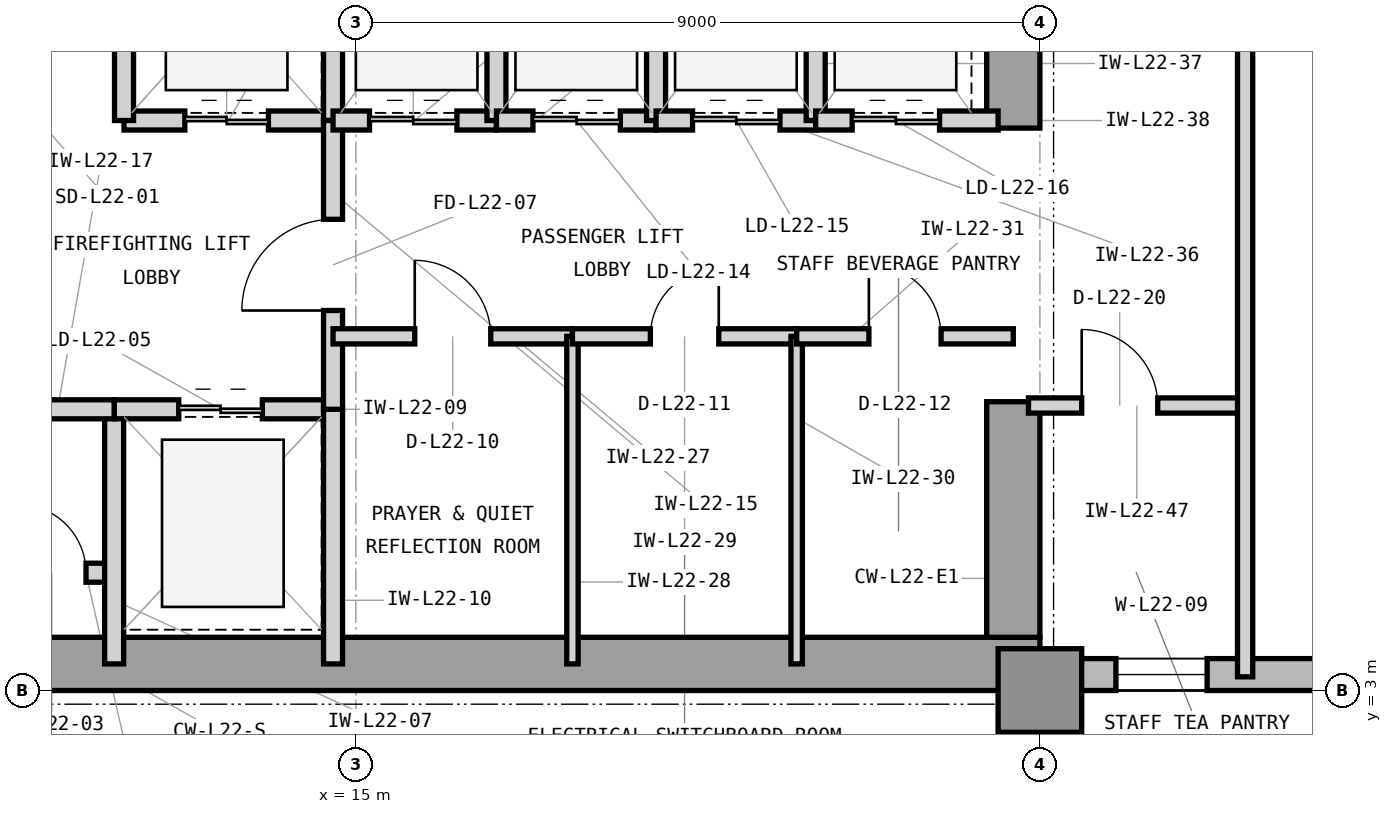
"""IFC4 building model, lengths in metres.
Left out: names, types, materials, properties, quantities, classifications, styles, units other than length and angle.
Written with IfcOpenShell. Run it as: python <this file> out.ifc"""

import sys

from ifc_helpers import new_model, si_unit, direction, frame, frame_2d, origin, origin_2d, place, context, subcontext, project, spatial, rectangle, extrude, element, fill, save


model = new_model("IFC4")
c1 = context("Model", 3, precision=1e-05, world=origin(), true_north=direction((0.0, 1.0)))
c2 = subcontext(c1, "Body", "Model", "MODEL_VIEW")
j1 = project(units=[si_unit("LENGTHUNIT", "METRE"), si_unit("PLANEANGLEUNIT", "RADIAN")], contexts=[c1])
p1 = place(None, origin())
s1 = spatial("IfcSite", under=j1, at=p1, CompositionType="ELEMENT")
p2 = place(p1, origin())
s2 = spatial("IfcBuilding", under=s1, at=p2, CompositionType="ELEMENT")
p3 = place(p2, frame((0.0, 0.0, 97.2)))
s3 = spatial("IfcBuildingStorey", under=s2, at=p3, CompositionType="ELEMENT", Elevation=97.2)
p4 = place(p3, frame((7.475, 3.35, 0.0), z_axis=(0.0, 0.0, 1.0), x_axis=(1.0, 0.0, 0.0)))
e1 = element("IfcWall", 1, at=p4, inside=s3, PredefinedType="SHEAR", context=c2, shape_type="SweptSolid", body=[
    extrude(rectangle(XDim=16.525, YDim=0.7, at=frame_2d((8.262, 0.0))), origin(), (0.0, 0.0, 1.0), 3.9),
])
p5 = place(p3, frame((23.65, 3.7, 0.0), z_axis=(0.0, 0.0, 1.0), x_axis=(0.0, 1.0, 0.0)))
e2 = element("IfcWall", 2, at=p5, inside=s3, PredefinedType="SHEAR", context=c2, shape_type="SweptSolid", body=[
    extrude(rectangle(XDim=3.1, YDim=0.7, at=frame_2d((1.55, 0.0))), origin(), (0.0, 0.0, 1.0), 3.9),
])
p6 = place(p3, frame((23.65, 10.4, 0.0), z_axis=(0.0, 0.0, 1.0), x_axis=(0.0, 1.0, 0.0)))
e3 = element("IfcWall", 3, at=p6, inside=s3, PredefinedType="SHEAR", context=c2, shape_type="SweptSolid", body=[
    extrude(rectangle(XDim=3.2, YDim=0.7, at=frame_2d((1.6, 0.0))), origin(), (0.0, 0.0, 1.0), 3.9),
])
p7 = place(p3, frame((24.0, 3.0, 0.0), z_axis=(0.0, 0.0, 1.0), x_axis=(1.0, 0.0, 0.0)))
e4 = element("IfcColumn", 4, at=p7, inside=s3, PredefinedType="COLUMN", context=c2, shape_type="SweptSolid", body=[
    extrude(rectangle(XDim=1.1, YDim=1.1, at=origin_2d()), origin(), (0.0, 0.0, 1.0), 3.9),
])
p8 = place(p3, frame((23.9, 3.21, 0.0), z_axis=(0.0, 0.0, 1.0), x_axis=(1.0, 0.0, 0.0)))
e5 = element("IfcWall", 5, at=p8, inside=s3, PredefinedType="STANDARD", context=c2, shape_type="SweptSolid", body=[
    extrude(rectangle(XDim=37.5, YDim=0.42, at=frame_2d((18.75, 0.0))), origin(), (0.0, 0.0, 1.0), 3.7),
])
p9 = place(p8, frame((19.844, 0.0, 0.85)))
e6 = element("IfcOpeningElement", 6, at=p9, cuts=e5, PredefinedType="OPENING", context=c2, shape_type="SweptSolid", body=[
    extrude(rectangle(XDim=2.5, YDim=2.25, at=frame_2d((1.25, 1.125))), frame((0.0, 0.22, 0.0), z_axis=(0.0, -1.0, 0.0), x_axis=(1.0, 0.0, 0.0)), (0.0, 0.0, 1.0), 0.44),
])
p10 = place(p8, frame((1.1, 0.0, 0.85)))
e7 = element("IfcOpeningElement", 7, at=p10, cuts=e5, PredefinedType="OPENING", context=c2, shape_type="SweptSolid", body=[
    extrude(rectangle(XDim=1.2, YDim=2.25, at=frame_2d((0.6, 1.125))), frame((0.0, 0.22, 0.0), z_axis=(0.0, -1.0, 0.0), x_axis=(1.0, 0.0, 0.0)), (0.0, 0.0, 1.0), 0.44),
])
p11 = place(p8, frame((5.286, 0.0, 0.85)))
e8 = element("IfcOpeningElement", 8, at=p11, cuts=e5, PredefinedType="OPENING", context=c2, shape_type="SweptSolid", body=[
    extrude(rectangle(XDim=2.5, YDim=2.25, at=frame_2d((1.25, 1.125))), frame((0.0, 0.22, 0.0), z_axis=(0.0, -1.0, 0.0), x_axis=(1.0, 0.0, 0.0)), (0.0, 0.0, 1.0), 0.44),
])
p12 = place(p8, frame((13.036, 0.0, 0.85)))
e9 = element("IfcOpeningElement", 9, at=p12, cuts=e5, PredefinedType="OPENING", context=c2, shape_type="SweptSolid", body=[
    extrude(rectangle(XDim=2.5, YDim=2.25, at=frame_2d((1.25, 1.125))), frame((0.0, 0.22, 0.0), z_axis=(0.0, -1.0, 0.0), x_axis=(1.0, 0.0, 0.0)), (0.0, 0.0, 1.0), 0.44),
])
p13 = place(p8, frame((27.986, 0.0, 0.85)))
e10 = element("IfcOpeningElement", 10, at=p13, cuts=e5, PredefinedType="OPENING", context=c2, shape_type="SweptSolid", body=[
    extrude(rectangle(XDim=1.2, YDim=2.25, at=frame_2d((0.6, 1.125))), frame((0.0, 0.22, 0.0), z_axis=(0.0, -1.0, 0.0), x_axis=(1.0, 0.0, 0.0)), (0.0, 0.0, 1.0), 0.44),
])
p14 = place(p3, frame((10.33, 4.55, 0.0), z_axis=(0.0, 0.0, 1.0), x_axis=(1.0, 0.0, 0.0)))
e11 = element("IfcWall", 11, at=p14, inside=s3, PredefinedType="PARTITIONING", context=c2, shape_type="SweptSolid", body=[
    extrude(rectangle(XDim=1.49, YDim=0.25, at=frame_2d((0.745, 0.0))), origin(), (0.0, 0.0, 1.0), 3.69),
])
p15 = place(p14, frame((0.22, 0.0, 0.0)))
e12 = element("IfcOpeningElement", 12, at=p15, cuts=e11, PredefinedType="OPENING", context=c2, shape_type="SweptSolid", body=[
    extrude(rectangle(XDim=0.9, YDim=2.1, at=frame_2d((0.45, 1.05))), frame((0.0, 0.135, 0.0), z_axis=(0.0, -1.0, 0.0), x_axis=(1.0, 0.0, 0.0)), (0.0, 0.0, 1.0), 0.27),
])
p16 = place(p3, frame((11.82, 3.35, 0.0), z_axis=(0.0, 0.0, 1.0), x_axis=(0.0, 1.0, 0.0)))
e13 = element("IfcWall", 13, at=p16, inside=s3, PredefinedType="PARTITIONING", context=c2, shape_type="SweptSolid", body=[
    extrude(rectangle(XDim=3.35, YDim=0.25, at=frame_2d((1.675, 0.0))), origin(), (0.0, 0.0, 1.0), 3.69),
])
p17 = place(p3, frame((11.82, 6.7, 0.0), z_axis=(0.0, 0.0, 1.0), x_axis=(1.0, 0.0, 0.0)))
e14 = element("IfcWall", 14, at=p17, inside=s3, PredefinedType="PARTITIONING", context=c2, shape_type="SweptSolid", body=[
    extrude(rectangle(XDim=2.88, YDim=0.25, at=frame_2d((1.44, 0.0))), origin(), (0.0, 0.0, 1.0), 3.227),
])
p18 = place(p17, frame((0.85, 0.0, 0.0)))
e15 = element("IfcOpeningElement", 15, at=p18, cuts=e14, PredefinedType="OPENING", context=c2, shape_type="SweptSolid", body=[
    extrude(rectangle(XDim=1.1, YDim=2.25, at=frame_2d((0.55, 1.125))), frame((0.0, 0.135, 0.0), z_axis=(0.0, -1.0, 0.0), x_axis=(1.0, 0.0, 0.0)), (0.0, 0.0, 1.0), 0.27),
])
p19 = place(p3, frame((14.7, 3.35, 0.0), z_axis=(0.0, 0.0, 1.0), x_axis=(0.0, 1.0, 0.0)))
e16 = element("IfcWall", 16, at=p19, inside=s3, PredefinedType="PARTITIONING", context=c2, shape_type="SweptSolid", body=[
    extrude(rectangle(XDim=3.35, YDim=0.25, at=frame_2d((1.675, 0.0))), origin(), (0.0, 0.0, 1.0), 3.69),
])
p20 = place(p3, frame((11.95, 10.5, 0.0), z_axis=(0.0, 0.0, 1.0), x_axis=(1.0, 0.0, 0.0)))
e17 = element("IfcWall", 17, at=p20, inside=s3, PredefinedType="PARTITIONING", context=c2, shape_type="SweptSolid", body=[
    extrude(rectangle(XDim=2.75, YDim=0.25, at=frame_2d((1.375, 0.0))), origin(), (0.0, 0.0, 1.0), 3.227),
])
p21 = place(p20, frame((0.8, 0.0, 0.0)))
e18 = element("IfcOpeningElement", 18, at=p21, cuts=e17, PredefinedType="OPENING", context=c2, shape_type="SweptSolid", body=[
    extrude(rectangle(XDim=1.1, YDim=2.25, at=frame_2d((0.55, 1.125))), frame((0.0, 0.135, 0.0), z_axis=(0.0, -1.0, 0.0), x_axis=(1.0, 0.0, 0.0)), (0.0, 0.0, 1.0), 0.27),
])
for number, where, z_axis, x_axis in (
    (19, (11.95, 10.5, 0.0), (0.0, 0.0, 1.0), (0.0, 1.0, 0.0)),
    (20, (14.7, 10.5, 0.0), (0.0, 0.0, 1.0), (0.0, 1.0, 0.0)),
):
    element("IfcWall", number, at=place(p3, frame(where, z_axis=z_axis, x_axis=x_axis)), inside=s3, PredefinedType="PARTITIONING", context=c2, shape_type="SweptSolid", body=[
        extrude(rectangle(XDim=3.0, YDim=0.25, at=frame_2d((1.5, 0.0))), origin(), (0.0, 0.0, 1.0), 3.69),
    ])
p22 = place(p3, frame((14.7, 6.7, 0.0), z_axis=(0.0, 0.0, 1.0), x_axis=(0.0, 1.0, 0.0)))
e21 = element("IfcWall", 21, at=p22, inside=s3, PredefinedType="PARTITIONING", context=c2, shape_type="SweptSolid", body=[
    extrude(rectangle(XDim=3.8, YDim=0.25, at=frame_2d((1.9, 0.0))), origin(), (0.0, 0.0, 1.0), 3.69),
])
p23 = place(p22, frame((1.3, 0.0, 0.0)))
e22 = element("IfcOpeningElement", 22, at=p23, cuts=e21, PredefinedType="OPENING", context=c2, shape_type="SweptSolid", body=[
    extrude(rectangle(XDim=1.2, YDim=2.2, at=frame_2d((0.6, 1.1))), frame((0.0, 0.135, 0.0), z_axis=(0.0, -1.0, 0.0), x_axis=(1.0, 0.0, 0.0)), (0.0, 0.0, 1.0), 0.27),
])
p24 = place(p3, frame((10.33, 6.7, 0.0), z_axis=(0.0, 0.0, 1.0), x_axis=(1.0, 0.0, 0.0)))
e23 = element("IfcWall", 23, at=p24, inside=s3, PredefinedType="PARTITIONING", context=c2, shape_type="SweptSolid", body=[
    extrude(rectangle(XDim=1.49, YDim=0.25, at=frame_2d((0.745, 0.0))), origin(), (0.0, 0.0, 1.0), 3.227),
])
p25 = place(p3, frame((14.7, 7.66, 0.0), z_axis=(0.0, 0.0, 1.0), x_axis=(1.0, 0.0, 0.0)))
e24 = element("IfcWall", 24, at=p25, inside=s3, PredefinedType="PARTITIONING", context=c2, shape_type="SweptSolid", body=[
    extrude(rectangle(XDim=3.15, YDim=0.2, at=frame_2d((1.575, 0.0))), origin(), (0.0, 0.0, 1.0), 3.69),
])
p26 = place(p25, frame((1.075, 0.0, 0.0)))
e25 = element("IfcOpeningElement", 25, at=p26, cuts=e24, PredefinedType="OPENING", context=c2, shape_type="SweptSolid", body=[
    extrude(rectangle(XDim=1.0, YDim=2.15, at=frame_2d((0.5, 1.075))), frame((0.0, 0.11, 0.0), z_axis=(0.0, -1.0, 0.0), x_axis=(1.0, 0.0, 0.0)), (0.0, 0.0, 1.0), 0.22),
])
p27 = place(p3, frame((17.85, 3.35, 0.0), z_axis=(0.0, 0.0, 1.0), x_axis=(0.0, 1.0, 0.0)))
e26 = element("IfcWall", 26, at=p27, inside=s3, PredefinedType="PARTITIONING", context=c2, shape_type="SweptSolid", body=[
    extrude(rectangle(XDim=4.31, YDim=0.15, at=frame_2d((2.155, 0.0))), origin(), (0.0, 0.0, 1.0), 3.69),
])
p28 = place(p3, frame((17.85, 7.66, 0.0), z_axis=(0.0, 0.0, 1.0), x_axis=(1.0, 0.0, 0.0)))
e27 = element("IfcWall", 27, at=p28, inside=s3, PredefinedType="PARTITIONING", context=c2, shape_type="SweptSolid", body=[
    extrude(rectangle(XDim=2.95, YDim=0.2, at=frame_2d((1.475, 0.0))), origin(), (0.0, 0.0, 1.0), 3.69),
])
p29 = place(p28, frame((1.025, 0.0, 0.0)))
e28 = element("IfcOpeningElement", 28, at=p29, cuts=e27, PredefinedType="OPENING", context=c2, shape_type="SweptSolid", body=[
    extrude(rectangle(XDim=0.9, YDim=2.1, at=frame_2d((0.45, 1.05))), frame((0.0, 0.11, 0.0), z_axis=(0.0, -1.0, 0.0), x_axis=(1.0, 0.0, 0.0)), (0.0, 0.0, 1.0), 0.22),
])
p30 = place(p3, frame((20.8, 3.35, 0.0), z_axis=(0.0, 0.0, 1.0), x_axis=(0.0, 1.0, 0.0)))
e29 = element("IfcWall", 29, at=p30, inside=s3, PredefinedType="PARTITIONING", context=c2, shape_type="SweptSolid", body=[
    extrude(rectangle(XDim=4.31, YDim=0.15, at=frame_2d((2.155, 0.0))), origin(), (0.0, 0.0, 1.0), 3.69),
])
p31 = place(p3, frame((20.8, 7.66, 0.0), z_axis=(0.0, 0.0, 1.0), x_axis=(1.0, 0.0, 0.0)))
e30 = element("IfcWall", 30, at=p31, inside=s3, PredefinedType="PARTITIONING", context=c2, shape_type="SweptSolid", body=[
    extrude(rectangle(XDim=2.85, YDim=0.2, at=frame_2d((1.425, 0.0))), origin(), (0.0, 0.0, 1.0), 3.69),
])
p32 = place(p31, frame((0.95, 0.0, 0.0)))
e31 = element("IfcOpeningElement", 31, at=p32, cuts=e30, PredefinedType="OPENING", context=c2, shape_type="SweptSolid", body=[
    extrude(rectangle(XDim=0.95, YDim=2.1, at=frame_2d((0.475, 1.05))), frame((0.0, 0.11, 0.0), z_axis=(0.0, -1.0, 0.0), x_axis=(1.0, 0.0, 0.0)), (0.0, 0.0, 1.0), 0.22),
])
p33 = place(p3, frame((14.7, 10.5, 0.0), z_axis=(0.0, 0.0, 1.0), x_axis=(1.0, 0.0, 0.0)))
e32 = element("IfcWall", 32, at=p33, inside=s3, PredefinedType="PARTITIONING", context=c2, shape_type="SweptSolid", body=[
    extrude(rectangle(XDim=2.15, YDim=0.25, at=frame_2d((1.075, 0.0))), origin(), (0.0, 0.0, 1.0), 3.227),
])
p34 = place(p33, frame((0.48, 0.0, 0.0)))
e33 = element("IfcOpeningElement", 33, at=p34, cuts=e32, PredefinedType="OPENING", context=c2, shape_type="SweptSolid", body=[
    extrude(rectangle(XDim=1.15, YDim=2.25, at=frame_2d((0.575, 1.125))), frame((0.0, 0.135, 0.0), z_axis=(0.0, -1.0, 0.0), x_axis=(1.0, 0.0, 0.0)), (0.0, 0.0, 1.0), 0.27),
])
p35 = place(p3, frame((16.85, 10.5, 0.0), z_axis=(0.0, 0.0, 1.0), x_axis=(0.0, 1.0, 0.0)))
e34 = element("IfcWall", 34, at=p35, inside=s3, PredefinedType="PARTITIONING", context=c2, shape_type="SweptSolid", body=[
    extrude(rectangle(XDim=3.0, YDim=0.25, at=frame_2d((1.5, 0.0))), origin(), (0.0, 0.0, 1.0), 3.69),
])
p36 = place(p3, frame((16.85, 10.5, 0.0), z_axis=(0.0, 0.0, 1.0), x_axis=(1.0, 0.0, 0.0)))
e35 = element("IfcWall", 35, at=p36, inside=s3, PredefinedType="PARTITIONING", context=c2, shape_type="SweptSolid", body=[
    extrude(rectangle(XDim=2.1, YDim=0.25, at=frame_2d((1.05, 0.0))), origin(), (0.0, 0.0, 1.0), 3.227),
])
p37 = place(p36, frame((0.48, 0.0, 0.0)))
e36 = element("IfcOpeningElement", 36, at=p37, cuts=e35, PredefinedType="OPENING", context=c2, shape_type="SweptSolid", body=[
    extrude(rectangle(XDim=1.15, YDim=2.25, at=frame_2d((0.575, 1.125))), frame((0.0, 0.135, 0.0), z_axis=(0.0, -1.0, 0.0), x_axis=(1.0, 0.0, 0.0)), (0.0, 0.0, 1.0), 0.27),
])
p38 = place(p3, frame((18.95, 10.5, 0.0), z_axis=(0.0, 0.0, 1.0), x_axis=(0.0, 1.0, 0.0)))
e37 = element("IfcWall", 37, at=p38, inside=s3, PredefinedType="PARTITIONING", context=c2, shape_type="SweptSolid", body=[
    extrude(rectangle(XDim=3.0, YDim=0.25, at=frame_2d((1.5, 0.0))), origin(), (0.0, 0.0, 1.0), 3.69),
])
p39 = place(p3, frame((18.95, 10.5, 0.0), z_axis=(0.0, 0.0, 1.0), x_axis=(1.0, 0.0, 0.0)))
e38 = element("IfcWall", 38, at=p39, inside=s3, PredefinedType="PARTITIONING", context=c2, shape_type="SweptSolid", body=[
    extrude(rectangle(XDim=2.1, YDim=0.25, at=frame_2d((1.05, 0.0))), origin(), (0.0, 0.0, 1.0), 3.227),
])
p40 = place(p39, frame((0.48, 0.0, 0.0)))
e39 = element("IfcOpeningElement", 39, at=p40, cuts=e38, PredefinedType="OPENING", context=c2, shape_type="SweptSolid", body=[
    extrude(rectangle(XDim=1.15, YDim=2.25, at=frame_2d((0.575, 1.125))), frame((0.0, 0.135, 0.0), z_axis=(0.0, -1.0, 0.0), x_axis=(1.0, 0.0, 0.0)), (0.0, 0.0, 1.0), 0.27),
])
p41 = place(p3, frame((21.05, 10.5, 0.0), z_axis=(0.0, 0.0, 1.0), x_axis=(0.0, 1.0, 0.0)))
e40 = element("IfcWall", 40, at=p41, inside=s3, PredefinedType="PARTITIONING", context=c2, shape_type="SweptSolid", body=[
    extrude(rectangle(XDim=3.0, YDim=0.25, at=frame_2d((1.5, 0.0))), origin(), (0.0, 0.0, 1.0), 3.69),
])
p42 = place(p3, frame((21.05, 10.5, 0.0), z_axis=(0.0, 0.0, 1.0), x_axis=(1.0, 0.0, 0.0)))
e41 = element("IfcWall", 41, at=p42, inside=s3, PredefinedType="PARTITIONING", context=c2, shape_type="SweptSolid", body=[
    extrude(rectangle(XDim=2.4, YDim=0.25, at=frame_2d((1.2, 0.0))), origin(), (0.0, 0.0, 1.0), 3.227),
])
p43 = place(p42, frame((0.48, 0.0, 0.0)))
e42 = element("IfcOpeningElement", 42, at=p43, cuts=e41, PredefinedType="OPENING", context=c2, shape_type="SweptSolid", body=[
    extrude(rectangle(XDim=1.15, YDim=2.25, at=frame_2d((0.575, 1.125))), frame((0.0, 0.135, 0.0), z_axis=(0.0, -1.0, 0.0), x_axis=(1.0, 0.0, 0.0)), (0.0, 0.0, 1.0), 0.27),
])
p44 = place(p3, frame((23.85, 6.75, 0.0), z_axis=(0.0, 0.0, 1.0), x_axis=(1.0, 0.0, 0.0)))
e43 = element("IfcWall", 43, at=p44, inside=s3, PredefinedType="PARTITIONING", context=c2, shape_type="SweptSolid", body=[
    extrude(rectangle(XDim=2.85, YDim=0.2, at=frame_2d((1.425, 0.0))), origin(), (0.0, 0.0, 1.0), 3.69),
])
p45 = place(p44, frame((0.7, 0.0, 0.0)))
e44 = element("IfcOpeningElement", 44, at=p45, cuts=e43, PredefinedType="OPENING", context=c2, shape_type="SweptSolid", body=[
    extrude(rectangle(XDim=1.0, YDim=2.15, at=frame_2d((0.5, 1.075))), frame((0.0, 0.11, 0.0), z_axis=(0.0, -1.0, 0.0), x_axis=(1.0, 0.0, 0.0)), (0.0, 0.0, 1.0), 0.22),
])
p46 = place(p3, frame((26.7, 3.18, 0.0), z_axis=(0.0, 0.0, 1.0), x_axis=(0.0, 1.0, 0.0)))
e45 = element("IfcWall", 45, at=p46, inside=s3, PredefinedType="PARTITIONING", context=c2, shape_type="SweptSolid", body=[
    extrude(rectangle(XDim=14.82, YDim=0.2, at=frame_2d((7.41, 0.0))), origin(), (0.0, 0.0, 1.0), 3.69),
])
p47 = place(p15, origin())
e46 = element("IfcDoor", 46, at=p47, inside=s3, OperationType="SINGLE_SWING_LEFT", PredefinedType="TRAPDOOR", context=c2, shape_type="SweptSolid", body=[
    extrude(rectangle(XDim=0.9, YDim=2.1, at=frame_2d((0.45, 1.05))), frame((0.0, 0.025, 0.0), z_axis=(0.0, -1.0, 0.0), x_axis=(1.0, 0.0, 0.0)), (0.0, 0.0, 1.0), 0.05),
])
fill(e12, e46)
p48 = place(p18, origin())
e47 = element("IfcDoor", 47, at=p48, inside=s3, OperationType="DOUBLE_DOOR_SLIDING", PredefinedType="DOOR", context=c2, shape_type="SweptSolid", body=[
    extrude(rectangle(XDim=1.1, YDim=2.25, at=frame_2d((0.55, 1.125))), frame((0.0, 0.025, 0.0), z_axis=(0.0, -1.0, 0.0), x_axis=(1.0, 0.0, 0.0)), (0.0, 0.0, 1.0), 0.05),
])
fill(e15, e47)
p49 = place(p21, origin())
e48 = element("IfcDoor", 48, at=p49, inside=s3, OperationType="DOUBLE_DOOR_SLIDING", PredefinedType="DOOR", context=c2, shape_type="SweptSolid", body=[
    extrude(rectangle(XDim=1.1, YDim=2.25, at=frame_2d((0.55, 1.125))), frame((0.0, 0.025, 0.0), z_axis=(0.0, -1.0, 0.0), x_axis=(1.0, 0.0, 0.0)), (0.0, 0.0, 1.0), 0.05),
])
fill(e18, e48)
p50 = place(p23, origin())
e49 = element("IfcDoor", 49, at=p50, inside=s3, OperationType="SINGLE_SWING_LEFT", PredefinedType="DOOR", context=c2, shape_type="SweptSolid", body=[
    extrude(rectangle(XDim=1.2, YDim=2.2, at=frame_2d((0.6, 1.1))), frame((0.0, 0.025, 0.0), z_axis=(0.0, -1.0, 0.0), x_axis=(1.0, 0.0, 0.0)), (0.0, 0.0, 1.0), 0.05),
])
fill(e22, e49)
p51 = place(p26, origin())
e50 = element("IfcDoor", 50, at=p51, inside=s3, OperationType="SINGLE_SWING_LEFT", PredefinedType="DOOR", context=c2, shape_type="SweptSolid", body=[
    extrude(rectangle(XDim=1.0, YDim=2.15, at=frame_2d((0.5, 1.075))), frame((0.0, 0.025, 0.0), z_axis=(0.0, -1.0, 0.0), x_axis=(1.0, 0.0, 0.0)), (0.0, 0.0, 1.0), 0.05),
])
fill(e25, e50)
p52 = place(p29, origin())
e51 = element("IfcDoor", 51, at=p52, inside=s3, OperationType="SINGLE_SWING_RIGHT", PredefinedType="TRAPDOOR", context=c2, shape_type="SweptSolid", body=[
    extrude(rectangle(XDim=0.9, YDim=2.1, at=frame_2d((0.45, 1.05))), frame((0.0, 0.025, 0.0), z_axis=(0.0, -1.0, 0.0), x_axis=(1.0, 0.0, 0.0)), (0.0, 0.0, 1.0), 0.05),
])
fill(e28, e51)
p53 = place(p32, origin())
e52 = element("IfcDoor", 52, at=p53, inside=s3, OperationType="SINGLE_SWING_LEFT", PredefinedType="DOOR", context=c2, shape_type="SweptSolid", body=[
    extrude(rectangle(XDim=0.95, YDim=2.1, at=frame_2d((0.475, 1.05))), frame((0.0, 0.025, 0.0), z_axis=(0.0, -1.0, 0.0), x_axis=(1.0, 0.0, 0.0)), (0.0, 0.0, 1.0), 0.05),
])
fill(e31, e52)
p54 = place(p34, origin())
e53 = element("IfcDoor", 53, at=p54, inside=s3, OperationType="DOUBLE_DOOR_SLIDING", PredefinedType="DOOR", context=c2, shape_type="SweptSolid", body=[
    extrude(rectangle(XDim=1.15, YDim=2.25, at=frame_2d((0.575, 1.125))), frame((0.0, 0.025, 0.0), z_axis=(0.0, -1.0, 0.0), x_axis=(1.0, 0.0, 0.0)), (0.0, 0.0, 1.0), 0.05),
])
fill(e33, e53)
p55 = place(p37, origin())
e54 = element("IfcDoor", 54, at=p55, inside=s3, OperationType="DOUBLE_DOOR_SLIDING", PredefinedType="DOOR", context=c2, shape_type="SweptSolid", body=[
    extrude(rectangle(XDim=1.15, YDim=2.25, at=frame_2d((0.575, 1.125))), frame((0.0, 0.025, 0.0), z_axis=(0.0, -1.0, 0.0), x_axis=(1.0, 0.0, 0.0)), (0.0, 0.0, 1.0), 0.05),
])
fill(e36, e54)
p56 = place(p40, origin())
e55 = element("IfcDoor", 55, at=p56, inside=s3, OperationType="DOUBLE_DOOR_SLIDING", PredefinedType="DOOR", context=c2, shape_type="SweptSolid", body=[
    extrude(rectangle(XDim=1.15, YDim=2.25, at=frame_2d((0.575, 1.125))), frame((0.0, 0.025, 0.0), z_axis=(0.0, -1.0, 0.0), x_axis=(1.0, 0.0, 0.0)), (0.0, 0.0, 1.0), 0.05),
])
fill(e39, e55)
p57 = place(p43, origin())
e56 = element("IfcDoor", 56, at=p57, inside=s3, OperationType="DOUBLE_DOOR_SLIDING", PredefinedType="DOOR", context=c2, shape_type="SweptSolid", body=[
    extrude(rectangle(XDim=1.15, YDim=2.25, at=frame_2d((0.575, 1.125))), frame((0.0, 0.025, 0.0), z_axis=(0.0, -1.0, 0.0), x_axis=(1.0, 0.0, 0.0)), (0.0, 0.0, 1.0), 0.05),
])
fill(e42, e56)
p58 = place(p45, origin())
e57 = element("IfcDoor", 57, at=p58, inside=s3, OperationType="SINGLE_SWING_LEFT", PredefinedType="DOOR", context=c2, shape_type="SweptSolid", body=[
    extrude(rectangle(XDim=1.0, YDim=2.15, at=frame_2d((0.5, 1.075))), frame((0.0, 0.025, 0.0), z_axis=(0.0, -1.0, 0.0), x_axis=(1.0, 0.0, 0.0)), (0.0, 0.0, 1.0), 0.05),
])
fill(e44, e57)
p59 = place(p10, origin())
e58 = element("IfcWindow", 58, at=p59, inside=s3, PartitioningType="SINGLE_PANEL", PredefinedType="WINDOW", context=c2, shape_type="SweptSolid", body=[
    extrude(rectangle(XDim=1.2, YDim=2.25, at=frame_2d((0.6, 1.125))), frame((0.0, 0.11, 0.0), z_axis=(0.0, -1.0, 0.0), x_axis=(1.0, 0.0, 0.0)), (0.0, 0.0, 1.0), 0.06),
])
fill(e7, e58)
save(model, sys.argv[1])
